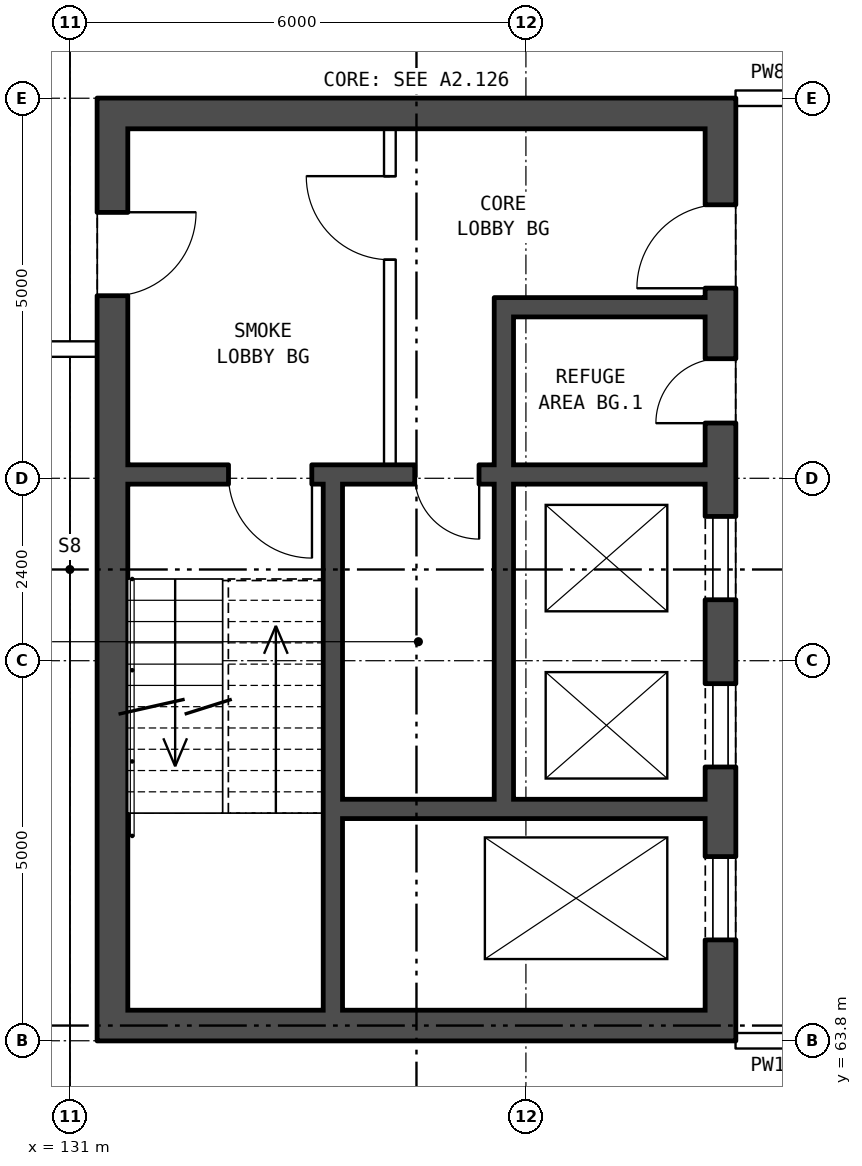
"""IFC4 building model, lengths in metres.
Left out: names, types, materials, properties, quantities, classifications, styles, units other than length and angle.
Written with IfcOpenShell. Run it as: python <this file> out.ifc"""

import sys

from ifc_helpers import new_model, si_unit, direction, frame, frame_2d, origin, place, context, subcontext, project, spatial, rectangle, extrude, element, fill, save


model = new_model("IFC4")
c1 = context("Model", 3, precision=1e-05, world=origin(), true_north=direction((0.0, 1.0)))
c2 = subcontext(c1, "Body", "Model", "MODEL_VIEW")
j1 = project(units=[si_unit("LENGTHUNIT", "METRE"), si_unit("PLANEANGLEUNIT", "RADIAN")], contexts=[c1])
p1 = place(None, origin())
s1 = spatial("IfcSite", under=j1, at=p1, CompositionType="ELEMENT")
p2 = place(p1, origin())
s2 = spatial("IfcBuilding", under=s1, at=p2, CompositionType="ELEMENT")
p3 = place(p2, frame((0.0, 0.0, 198.6)))
s3 = spatial("IfcBuildingStorey", under=s2, at=p3, CompositionType="ELEMENT", Elevation=198.6)
p4 = place(p3, frame((139.56, 63.8, 0.0), z_axis=(0.0, 0.0, 1.0), x_axis=(0.0, 1.0, 0.0)))
e1 = element("IfcWall", 1, at=p4, inside=s3, PredefinedType="SHEAR", context=c2, shape_type="SweptSolid", body=[
    extrude(rectangle(XDim=12.4, YDim=0.4, at=frame_2d((6.2, 0.0))), origin(), (0.0, 0.0, 1.0), 3.7),
])
p5 = place(p4, frame((1.325, 0.0, 0.0)))
e2 = element("IfcOpeningElement", 2, at=p5, cuts=e1, PredefinedType="OPENING", context=c2, shape_type="SweptSolid", body=[
    extrude(rectangle(XDim=1.1, YDim=2.1, at=frame_2d((0.55, 1.05))), frame((0.0, 0.21, 0.0), z_axis=(0.0, -1.0, 0.0), x_axis=(1.0, 0.0, 0.0)), (0.0, 0.0, 1.0), 0.42),
])
p6 = place(p4, frame((3.6, 0.0, 0.0)))
e3 = element("IfcOpeningElement", 3, at=p6, cuts=e1, PredefinedType="OPENING", context=c2, shape_type="SweptSolid", body=[
    extrude(rectangle(XDim=1.1, YDim=2.1, at=frame_2d((0.55, 1.05))), frame((0.0, 0.21, 0.0), z_axis=(0.0, -1.0, 0.0), x_axis=(1.0, 0.0, 0.0)), (0.0, 0.0, 1.0), 0.42),
])
p7 = place(p4, frame((5.8, 0.0, 0.0)))
e4 = element("IfcOpeningElement", 4, at=p7, cuts=e1, PredefinedType="OPENING", context=c2, shape_type="SweptSolid", body=[
    extrude(rectangle(XDim=1.1, YDim=2.1, at=frame_2d((0.55, 1.05))), frame((0.0, 0.21, 0.0), z_axis=(0.0, -1.0, 0.0), x_axis=(1.0, 0.0, 0.0)), (0.0, 0.0, 1.0), 0.42),
])
p8 = place(p4, frame((9.9, 0.0, 0.0)))
e5 = element("IfcOpeningElement", 5, at=p8, cuts=e1, PredefinedType="OPENING", context=c2, shape_type="SweptSolid", body=[
    extrude(rectangle(XDim=1.1, YDim=2.1, at=frame_2d((0.55, 1.05))), frame((0.0, 0.21, 0.0), z_axis=(0.0, -1.0, 0.0), x_axis=(1.0, 0.0, 0.0)), (0.0, 0.0, 1.0), 0.42),
])
p9 = place(p4, frame((8.125, 0.0, 0.0)))
e6 = element("IfcOpeningElement", 6, at=p9, cuts=e1, PredefinedType="OPENING", context=c2, shape_type="SweptSolid", body=[
    extrude(rectangle(XDim=0.85, YDim=2.1, at=frame_2d((0.425, 1.05))), frame((0.0, 0.21, 0.0), z_axis=(0.0, -1.0, 0.0), x_axis=(1.0, 0.0, 0.0)), (0.0, 0.0, 1.0), 0.42),
])
p10 = place(p3, frame((131.56, 63.8, 0.0), z_axis=(0.0, 0.0, 1.0), x_axis=(0.0, 1.0, 0.0)))
e7 = element("IfcWall", 7, at=p10, inside=s3, PredefinedType="SHEAR", context=c2, shape_type="SweptSolid", body=[
    extrude(rectangle(XDim=12.4, YDim=0.4, at=frame_2d((6.2, 0.0))), origin(), (0.0, 0.0, 1.0), 3.7),
])
p11 = place(p10, frame((9.8, 0.0, 0.0)))
e8 = element("IfcOpeningElement", 8, at=p11, cuts=e7, PredefinedType="OPENING", context=c2, shape_type="SweptSolid", body=[
    extrude(rectangle(XDim=1.1, YDim=2.1, at=frame_2d((0.55, 1.05))), frame((0.0, 0.21, 0.0), z_axis=(0.0, -1.0, 0.0), x_axis=(1.0, 0.0, 0.0)), (0.0, 0.0, 1.0), 0.42),
])
for number, where, z_axis, x_axis in (
    (9, (139.36, 64.0, 0.0), (0.0, 0.0, 1.0), (-1.0, 0.0, 0.0)),
    (10, (139.36, 76.0, 0.0), (0.0, 0.0, 1.0), (-1.0, 0.0, 0.0)),
):
    element("IfcWall", number, at=place(p3, frame(where, z_axis=z_axis, x_axis=x_axis)), inside=s3, PredefinedType="SHEAR", context=c2, shape_type="SweptSolid", body=[
        extrude(rectangle(XDim=7.6, YDim=0.4, at=frame_2d((3.8, 0.0))), origin(), (0.0, 0.0, 1.0), 3.7),
    ])
p12 = place(p3, frame((139.36, 66.85, 0.0), z_axis=(0.0, 0.0, 1.0), x_axis=(-1.0, 0.0, 0.0)))
e11 = element("IfcWall", 11, at=p12, inside=s3, PredefinedType="SHEAR", context=c2, shape_type="SweptSolid", body=[
    extrude(rectangle(XDim=4.775, YDim=0.25, at=frame_2d((2.388, 0.0))), origin(), (0.0, 0.0, 1.0), 3.7),
])
p13 = place(p3, frame((139.36, 71.25, 0.0), z_axis=(0.0, 0.0, 1.0), x_axis=(-1.0, 0.0, 0.0)))
e12 = element("IfcWall", 12, at=p13, inside=s3, PredefinedType="SHEAR", context=c2, shape_type="SweptSolid", body=[
    extrude(rectangle(XDim=7.6, YDim=0.25, at=frame_2d((3.8, 0.0))), origin(), (0.0, 0.0, 1.0), 3.7),
])
p14 = place(p13, frame((5.175, 0.0, 0.0)))
e13 = element("IfcOpeningElement", 13, at=p14, cuts=e12, PredefinedType="OPENING", context=c2, shape_type="SweptSolid", body=[
    extrude(rectangle(XDim=1.1, YDim=2.1, at=frame_2d((0.55, 1.05))), frame((0.0, 0.135, 0.0), z_axis=(0.0, -1.0, 0.0), x_axis=(1.0, 0.0, 0.0)), (0.0, 0.0, 1.0), 0.27),
])
p15 = place(p13, frame((2.975, 0.0, 0.0)))
e14 = element("IfcOpeningElement", 14, at=p15, cuts=e12, PredefinedType="OPENING", context=c2, shape_type="SweptSolid", body=[
    extrude(rectangle(XDim=0.85, YDim=2.1, at=frame_2d((0.425, 1.05))), frame((0.0, 0.135, 0.0), z_axis=(0.0, -1.0, 0.0), x_axis=(1.0, 0.0, 0.0)), (0.0, 0.0, 1.0), 0.27),
])
p16 = place(p3, frame((139.36, 73.45, 0.0), z_axis=(0.0, 0.0, 1.0), x_axis=(-1.0, 0.0, 0.0)))
e15 = element("IfcWall", 15, at=p16, inside=s3, PredefinedType="SHEAR", context=c2, shape_type="SweptSolid", body=[
    extrude(rectangle(XDim=2.525, YDim=0.25, at=frame_2d((1.263, 0.0))), origin(), (0.0, 0.0, 1.0), 3.7),
])
p17 = place(p3, frame((136.71, 66.975, 0.0), z_axis=(0.0, 0.0, 1.0), x_axis=(0.0, 1.0, 0.0)))
e16 = element("IfcWall", 16, at=p17, inside=s3, PredefinedType="SHEAR", context=c2, shape_type="SweptSolid", body=[
    extrude(rectangle(XDim=4.15, YDim=0.25, at=frame_2d((2.075, 0.0))), origin(), (0.0, 0.0, 1.0), 3.7),
])
p18 = place(p3, frame((136.71, 71.375, 0.0), z_axis=(0.0, 0.0, 1.0), x_axis=(0.0, 1.0, 0.0)))
e17 = element("IfcWall", 17, at=p18, inside=s3, PredefinedType="SHEAR", context=c2, shape_type="SweptSolid", body=[
    extrude(rectangle(XDim=2.2, YDim=0.25, at=frame_2d((1.1, 0.0))), origin(), (0.0, 0.0, 1.0), 3.7),
])
p19 = place(p3, frame((135.21, 71.375, 0.0), z_axis=(0.0, 0.0, 1.0), x_axis=(0.0, 1.0, 0.0)))
e18 = element("IfcWall", 18, at=p19, inside=s3, PredefinedType="PARTITIONING", context=c2, shape_type="SweptSolid", body=[
    extrude(rectangle(XDim=4.425, YDim=0.15, at=frame_2d((2.212, 0.0))), origin(), (0.0, 0.0, 1.0), 3.7),
])
p20 = place(p19, frame((2.7, 0.0, 0.0)))
e19 = element("IfcOpeningElement", 19, at=p20, cuts=e18, PredefinedType="OPENING", context=c2, shape_type="SweptSolid", body=[
    extrude(rectangle(XDim=1.1, YDim=2.1, at=frame_2d((0.55, 1.05))), frame((0.0, 0.085, 0.0), z_axis=(0.0, -1.0, 0.0), x_axis=(1.0, 0.0, 0.0)), (0.0, 0.0, 1.0), 0.17),
])
p21 = place(p3, frame((134.46, 64.2, 0.0), z_axis=(0.0, 0.0, 1.0), x_axis=(0.0, 1.0, 0.0)))
e20 = element("IfcWall", 20, at=p21, inside=s3, PredefinedType="SHEAR", context=c2, shape_type="SweptSolid", body=[
    extrude(rectangle(XDim=6.925, YDim=0.25, at=frame_2d((3.462, 0.0))), origin(), (0.0, 0.0, 1.0), 3.7),
])
p22 = place(p3, frame((139.76, 63.8, 0.0), z_axis=(0.0, 0.0, 1.0), x_axis=(1.0, 0.0, 0.0)))
e21 = element("IfcWall", 21, at=p22, inside=s3, PredefinedType="PARTITIONING", context=c2, shape_type="SweptSolid", body=[
    extrude(rectangle(XDim=3.0, YDim=0.2, at=frame_2d((1.5, 0.0))), origin(), (0.0, 0.0, 1.0), 3.7),
])
p23 = place(p22, frame((1.0, 0.0, 0.0)))
e22 = element("IfcOpeningElement", 22, at=p23, cuts=e21, PredefinedType="OPENING", context=c2, shape_type="SweptSolid", body=[
    extrude(rectangle(XDim=1.0, YDim=2.1, at=frame_2d((0.5, 1.05))), frame((0.0, 0.11, 0.0), z_axis=(0.0, -1.0, 0.0), x_axis=(1.0, 0.0, 0.0)), (0.0, 0.0, 1.0), 0.22),
])
p24 = place(p3, frame((75.64, 72.9, 0.0), z_axis=(0.0, 0.0, 1.0), x_axis=(1.0, 0.0, 0.0)))
e23 = element("IfcWall", 23, at=p24, inside=s3, PredefinedType="PARTITIONING", context=c2, shape_type="SweptSolid", body=[
    extrude(rectangle(XDim=55.72, YDim=0.2, at=frame_2d((27.86, 0.0))), origin(), (0.0, 0.0, 1.0), 3.7),
])
p25 = place(p24, frame((6.555, 0.0, 0.0)))
e24 = element("IfcOpeningElement", 24, at=p25, cuts=e23, PredefinedType="OPENING", context=c2, shape_type="SweptSolid", body=[
    extrude(rectangle(XDim=1.0, YDim=2.1, at=frame_2d((0.5, 1.05))), frame((0.0, 0.11, 0.0), z_axis=(0.0, -1.0, 0.0), x_axis=(1.0, 0.0, 0.0)), (0.0, 0.0, 1.0), 0.22),
])
p26 = place(p24, frame((23.922, 0.0, 0.0)))
e25 = element("IfcOpeningElement", 25, at=p26, cuts=e23, PredefinedType="OPENING", context=c2, shape_type="SweptSolid", body=[
    extrude(rectangle(XDim=1.0, YDim=2.1, at=frame_2d((0.5, 1.05))), frame((0.0, 0.11, 0.0), z_axis=(0.0, -1.0, 0.0), x_axis=(1.0, 0.0, 0.0)), (0.0, 0.0, 1.0), 0.22),
])
p27 = place(p24, frame((44.728, 0.0, 0.0)))
e26 = element("IfcOpeningElement", 26, at=p27, cuts=e23, PredefinedType="OPENING", context=c2, shape_type="SweptSolid", body=[
    extrude(rectangle(XDim=1.0, YDim=2.1, at=frame_2d((0.5, 1.05))), frame((0.0, 0.11, 0.0), z_axis=(0.0, -1.0, 0.0), x_axis=(1.0, 0.0, 0.0)), (0.0, 0.0, 1.0), 0.22),
])
p28 = place(p3, frame((139.76, 76.2, 0.0), z_axis=(0.0, 0.0, 1.0), x_axis=(1.0, 0.0, 0.0)))
e27 = element("IfcWall", 27, at=p28, inside=s3, PredefinedType="PARTITIONING", context=c2, shape_type="SweptSolid", body=[
    extrude(rectangle(XDim=3.0, YDim=0.2, at=frame_2d((1.5, 0.0))), origin(), (0.0, 0.0, 1.0), 3.7),
])
p29 = place(p28, frame((1.0, 0.0, 0.0)))
e28 = element("IfcOpeningElement", 28, at=p29, cuts=e27, PredefinedType="OPENING", context=c2, shape_type="SweptSolid", body=[
    extrude(rectangle(XDim=1.0, YDim=2.1, at=frame_2d((0.5, 1.05))), frame((0.0, 0.11, 0.0), z_axis=(0.0, -1.0, 0.0), x_axis=(1.0, 0.0, 0.0)), (0.0, 0.0, 1.0), 0.22),
])
p30 = place(p5, origin())
e29 = element("IfcDoor", 29, at=p30, inside=s3, OperationType="DOUBLE_DOOR_SLIDING", PredefinedType="DOOR", context=c2, shape_type="SweptSolid", body=[
    extrude(rectangle(XDim=1.1, YDim=2.1, at=frame_2d((0.55, 1.05))), frame((0.0, 0.185, 0.0), z_axis=(0.0, -1.0, 0.0), x_axis=(1.0, 0.0, 0.0)), (0.0, 0.0, 1.0), 0.05),
])
fill(e2, e29)
p31 = place(p6, origin())
e30 = element("IfcDoor", 30, at=p31, inside=s3, OperationType="DOUBLE_DOOR_SLIDING", PredefinedType="DOOR", context=c2, shape_type="SweptSolid", body=[
    extrude(rectangle(XDim=1.1, YDim=2.1, at=frame_2d((0.55, 1.05))), frame((0.0, 0.185, 0.0), z_axis=(0.0, -1.0, 0.0), x_axis=(1.0, 0.0, 0.0)), (0.0, 0.0, 1.0), 0.05),
])
fill(e3, e30)
p32 = place(p7, origin())
e31 = element("IfcDoor", 31, at=p32, inside=s3, OperationType="DOUBLE_DOOR_SLIDING", PredefinedType="DOOR", context=c2, shape_type="SweptSolid", body=[
    extrude(rectangle(XDim=1.1, YDim=2.1, at=frame_2d((0.55, 1.05))), frame((0.0, 0.185, 0.0), z_axis=(0.0, -1.0, 0.0), x_axis=(1.0, 0.0, 0.0)), (0.0, 0.0, 1.0), 0.05),
])
fill(e4, e31)
p33 = place(p8, origin())
e32 = element("IfcDoor", 32, at=p33, inside=s3, OperationType="SINGLE_SWING_LEFT", PredefinedType="DOOR", context=c2, shape_type="SweptSolid", body=[
    extrude(rectangle(XDim=1.1, YDim=2.1, at=frame_2d((0.55, 1.05))), frame((0.0, 0.185, 0.0), z_axis=(0.0, -1.0, 0.0), x_axis=(1.0, 0.0, 0.0)), (0.0, 0.0, 1.0), 0.05),
])
fill(e5, e32)
p34 = place(p20, origin())
e33 = element("IfcDoor", 33, at=p34, inside=s3, OperationType="SINGLE_SWING_RIGHT", PredefinedType="DOOR", context=c2, shape_type="SweptSolid", body=[
    extrude(rectangle(XDim=1.1, YDim=2.1, at=frame_2d((0.55, 1.05))), frame((0.0, 0.025, 0.0), z_axis=(0.0, -1.0, 0.0), x_axis=(1.0, 0.0, 0.0)), (0.0, 0.0, 1.0), 0.05),
])
fill(e19, e33)
p35 = place(p14, origin())
e34 = element("IfcDoor", 34, at=p35, inside=s3, OperationType="SINGLE_SWING_LEFT", PredefinedType="DOOR", context=c2, shape_type="SweptSolid", body=[
    extrude(rectangle(XDim=1.1, YDim=2.1, at=frame_2d((0.55, 1.05))), frame((0.0, 0.025, 0.0), z_axis=(0.0, -1.0, 0.0), x_axis=(1.0, 0.0, 0.0)), (0.0, 0.0, 1.0), 0.05),
])
fill(e13, e34)
p36 = place(p9, origin())
e35 = element("IfcDoor", 35, at=p36, inside=s3, OperationType="SINGLE_SWING_LEFT", PredefinedType="DOOR", context=c2, shape_type="SweptSolid", body=[
    extrude(rectangle(XDim=0.85, YDim=2.1, at=frame_2d((0.425, 1.05))), frame((0.0, 0.185, 0.0), z_axis=(0.0, -1.0, 0.0), x_axis=(1.0, 0.0, 0.0)), (0.0, 0.0, 1.0), 0.05),
])
fill(e6, e35)
p37 = place(p15, origin())
e36 = element("IfcDoor", 36, at=p37, inside=s3, OperationType="SINGLE_SWING_LEFT", PredefinedType="DOOR", context=c2, shape_type="SweptSolid", body=[
    extrude(rectangle(XDim=0.85, YDim=2.1, at=frame_2d((0.425, 1.05))), frame((0.0, 0.025, 0.0), z_axis=(0.0, -1.0, 0.0), x_axis=(1.0, 0.0, 0.0)), (0.0, 0.0, 1.0), 0.05),
])
fill(e14, e36)
p38 = place(p11, frame((1.1, 0.0, 0.0), z_axis=(0.0, 0.0, 1.0), x_axis=(-1.0, 0.0, 0.0)))
e37 = element("IfcDoor", 37, at=p38, inside=s3, OperationType="SINGLE_SWING_LEFT", PredefinedType="DOOR", context=c2, shape_type="SweptSolid", body=[
    extrude(rectangle(XDim=1.1, YDim=2.1, at=frame_2d((0.55, 1.05))), frame((0.0, 0.185, 0.0), z_axis=(0.0, -1.0, 0.0), x_axis=(1.0, 0.0, 0.0)), (0.0, 0.0, 1.0), 0.05),
])
fill(e8, e37)
save(model, sys.argv[1])
